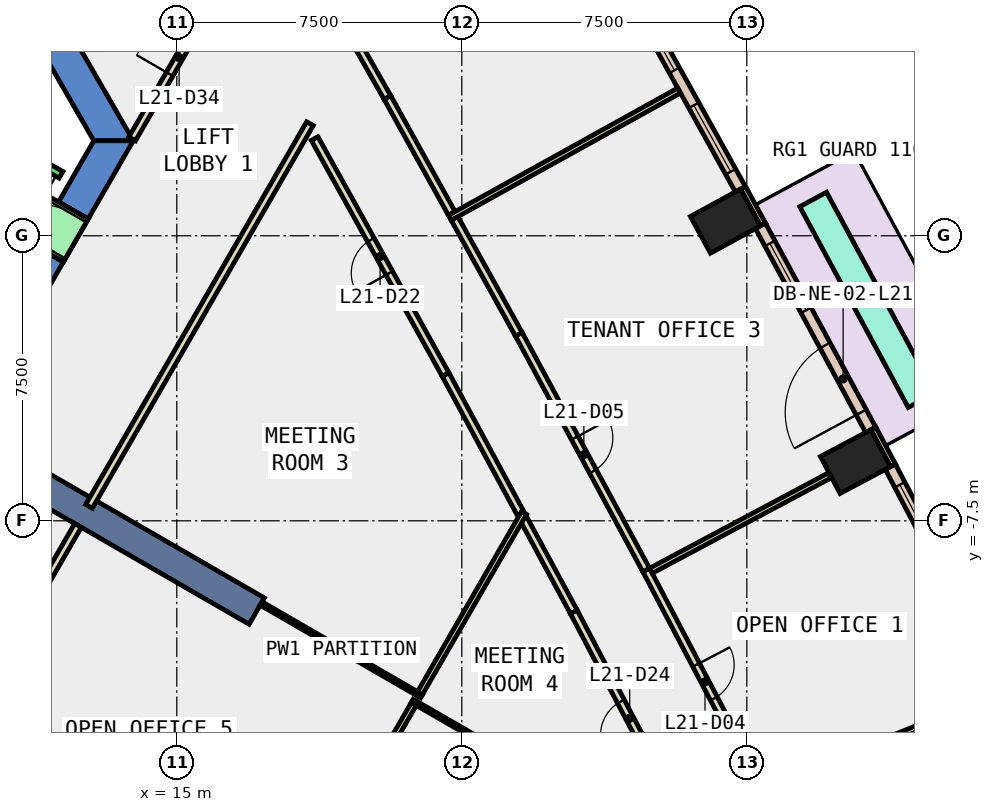
"""IFC4 building model, lengths in metres.
Left out: names, types, materials, properties, quantities, classifications, styles, units other than length and angle.
Written with IfcOpenShell. Run it as: python <this file> out.ifc"""

import sys

from ifc_helpers import new_model, si_unit, direction, frame, frame_2d, origin, origin_2d, place, context, subcontext, project, spatial, polyline, rectangle, outline, extrude, element, fill, save


model = new_model("IFC4")
c1 = context("Model", 3, precision=1e-05, world=origin(), true_north=direction((0.0, 1.0)))
c2 = subcontext(c1, "Body", "Model", "MODEL_VIEW")
j1 = project(units=[si_unit("LENGTHUNIT", "METRE"), si_unit("PLANEANGLEUNIT", "RADIAN")], contexts=[c1])
p1 = place(None, origin())
s1 = spatial("IfcSite", under=j1, at=p1, CompositionType="ELEMENT")
p2 = place(p1, origin())
s2 = spatial("IfcBuilding", under=s1, at=p2, CompositionType="ELEMENT")
p3 = place(p2, frame((0.0, 0.0, 99.2)))
s3 = spatial("IfcBuildingStorey", under=s2, at=p3, CompositionType="ELEMENT", Elevation=99.2)
for number, where, z_axis, x_axis in (
    (1, (32.858, -5.943, -0.4), (0.0, 0.0, 1.0), (-0.469, 0.883, 0.0)),
    (2, (29.438, 0.385, -0.4), (0.0, 0.0, 1.0), (-0.48, 0.877, 0.0)),
):
    element("IfcColumn", number, at=place(p3, frame(where, z_axis=z_axis, x_axis=x_axis)), inside=s3, PredefinedType="COLUMN", context=c2, shape_type="SweptSolid", body=[
        extrude(rectangle(XDim=1.1, YDim=1.5, at=origin_2d()), origin(), (0.0, 0.0, 1.0), 4.2),
    ])
p4 = place(p3, frame((0.0, 0.0, -0.4)))
e3 = element("IfcWall", 3, at=p4, inside=s3, PredefinedType="SHEAR", context=c2, shape_type="SweptSolid", body=[
    extrude(outline(polyline([(8.517, 11.748), (7.738, 11.298), (12.817, 2.5), (13.856, 2.5), (8.517, 11.748)])), origin(), (0.0, 0.0, 1.0), 4.2),
])
p5 = place(p3, frame((0.0, 0.0, -0.4)))
e4 = element("IfcWall", 4, at=p5, inside=s3, PredefinedType="SHEAR", context=c2, shape_type="SweptSolid", body=[
    extrude(outline(polyline([(12.017, -0.686), (11.238, -0.236), (10.588, -1.361), (11.367, -1.811), (12.017, -0.686)])), origin(), (0.0, 0.0, 1.0), 4.2),
])
p6 = place(p3, frame((0.0, 0.0, -0.4)))
e5 = element("IfcWall", 5, at=p6, inside=s3, PredefinedType="SHEAR", context=c2, shape_type="SweptSolid", body=[
    extrude(outline(polyline([(11.888, 0.89), (12.667, 0.44), (13.856, 2.5), (12.817, 2.5), (11.888, 0.89)])), origin(), (0.0, 0.0, 1.0), 4.2),
])
p7 = place(p3, frame((0.0, 0.0, 3.6)))
e6 = element("IfcWall", 6, at=p7, inside=s3, PredefinedType="SHEAR", context=c2, shape_type="SweptSolid", body=[
    extrude(outline(polyline([(12.667, 0.44), (11.888, 0.89), (11.238, -0.236), (12.017, -0.686), (12.667, 0.44)])), origin(), (0.0, 0.0, 1.0), 0.2),
])
p8 = place(p3, frame((9.31, -5.375, -0.4), z_axis=(0.0, 0.0, 1.0), x_axis=(0.866017533419, -0.500013631625, 0.0)))
e7 = element("IfcWall", 7, at=p8, inside=s3, PredefinedType="SHEAR", context=c2, shape_type="SweptSolid", body=[
    extrude(rectangle(XDim=9.0, YDim=0.8, at=frame_2d((4.5, 0.0))), origin(), (0.0, 0.0, 1.0), 4.2),
])
p9 = place(p3, frame((33.845, -6.042, 0.0), z_axis=(0.0, 0.0, 1.0), x_axis=(-0.46919310775, 0.883095593716, 0.0)))
e8 = element("IfcWall", 8, at=p9, inside=s3, PredefinedType="STANDARD", context=c2, shape_type="SweptSolid", body=[
    extrude(rectangle(XDim=1.099, YDim=0.15, at=frame_2d((0.55, 0.0))), origin(), (0.0, 0.0, 1.0), 3.8),
])
p10 = place(p3, frame((30.426, 0.298, 0.0), z_axis=(0.0, 0.0, 1.0), x_axis=(-0.479737645119, 0.877411985247, 0.0)))
e9 = element("IfcWall", 9, at=p10, inside=s3, PredefinedType="STANDARD", context=c2, shape_type="SweptSolid", body=[
    extrude(rectangle(XDim=1.101, YDim=0.15, at=frame_2d((0.55, 0.0))), origin(), (0.0, 0.0, 1.0), 3.8),
])
p11 = place(p3, frame((36.633, -11.511, 0.0), z_axis=(0.0, 0.0, 1.0), x_axis=(-0.465380908665, 0.88511050714, 0.0)))
e10 = element("IfcWall", 10, at=p11, inside=s3, PredefinedType="STANDARD", context=c2, shape_type="SweptSolid", body=[
    extrude(rectangle(XDim=6.139, YDim=0.3, at=frame_2d((3.07, 0.0))), origin(), (0.0, 0.0, 1.0), 3.8),
])
p12 = place(p11, frame((0.535, 0.0, 0.9)))
e11 = element("IfcOpeningElement", 11, at=p12, cuts=e10, PredefinedType="OPENING", context=c2, shape_type="SweptSolid", body=[
    extrude(rectangle(XDim=2.0, YDim=2.6, at=frame_2d((1.0, 1.3))), frame((0.0, 0.16, 0.0), z_axis=(0.0, -1.0, 0.0), x_axis=(1.0, 0.0, 0.0)), (0.0, 0.0, 1.0), 0.32),
])
p13 = place(p11, frame((3.604, 0.0, 0.9)))
e12 = element("IfcOpeningElement", 12, at=p13, cuts=e10, PredefinedType="OPENING", context=c2, shape_type="SweptSolid", body=[
    extrude(rectangle(XDim=2.0, YDim=2.6, at=frame_2d((1.0, 1.3))), frame((0.0, 0.16, 0.0), z_axis=(0.0, -1.0, 0.0), x_axis=(1.0, 0.0, 0.0)), (0.0, 0.0, 1.0), 0.32),
])
p14 = place(p3, frame((33.26, -5.108, 0.0), z_axis=(0.0, 0.0, 1.0), x_axis=(-0.475573079782, 0.879676216449, 0.0)))
e13 = element("IfcWall", 13, at=p14, inside=s3, PredefinedType="STANDARD", context=c2, shape_type="SweptSolid", body=[
    extrude(rectangle(XDim=6.104, YDim=0.3, at=frame_2d((3.052, 0.0))), origin(), (0.0, 0.0, 1.0), 3.8),
])
p15 = place(p14, frame((0.526, 0.0, 0.0)))
e14 = element("IfcOpeningElement", 14, at=p15, cuts=e13, PredefinedType="OPENING", context=c2, shape_type="SweptSolid", body=[
    extrude(rectangle(XDim=2.0, YDim=2.4, at=frame_2d((1.0, 1.2))), frame((0.0, 0.16, 0.0), z_axis=(0.0, -1.0, 0.0), x_axis=(1.0, 0.0, 0.0)), (0.0, 0.0, 1.0), 0.32),
])
p16 = place(p14, frame((3.578, 0.0, 0.9)))
e15 = element("IfcOpeningElement", 15, at=p16, cuts=e13, PredefinedType="OPENING", context=c2, shape_type="SweptSolid", body=[
    extrude(rectangle(XDim=2.0, YDim=2.6, at=frame_2d((1.0, 1.3))), frame((0.0, 0.16, 0.0), z_axis=(0.0, -1.0, 0.0), x_axis=(1.0, 0.0, 0.0)), (0.0, 0.0, 1.0), 0.32),
])
p17 = place(p3, frame((29.83, 1.225, 0.0), z_axis=(0.0, 0.0, 1.0), x_axis=(-0.485170774404, 0.874419418623, 0.0)))
e16 = element("IfcWall", 16, at=p17, inside=s3, PredefinedType="STANDARD", context=c2, shape_type="SweptSolid", body=[
    extrude(rectangle(XDim=6.103, YDim=0.3, at=frame_2d((3.052, 0.0))), origin(), (0.0, 0.0, 1.0), 3.8),
])
p18 = place(p17, frame((0.526, 0.0, 0.9)))
e17 = element("IfcOpeningElement", 17, at=p18, cuts=e16, PredefinedType="OPENING", context=c2, shape_type="SweptSolid", body=[
    extrude(rectangle(XDim=2.0, YDim=2.6, at=frame_2d((1.0, 1.3))), frame((0.0, 0.16, 0.0), z_axis=(0.0, -1.0, 0.0), x_axis=(1.0, 0.0, 0.0)), (0.0, 0.0, 1.0), 0.32),
])
p19 = place(p17, frame((3.578, 0.0, 0.9)))
e18 = element("IfcOpeningElement", 18, at=p19, cuts=e16, PredefinedType="OPENING", context=c2, shape_type="SweptSolid", body=[
    extrude(rectangle(XDim=2.0, YDim=2.6, at=frame_2d((1.0, 1.3))), frame((0.0, 0.16, 0.0), z_axis=(0.0, -1.0, 0.0), x_axis=(1.0, 0.0, 0.0)), (0.0, 0.0, 1.0), 0.32),
])
p20 = place(p3, frame((34.599, -4.328, 0.0), z_axis=(0.0, 0.0, 1.0), x_axis=(-0.475304416573, 0.879821408916, 0.0)))
e19 = element("IfcWall", 19, at=p20, inside=s3, PredefinedType="STANDARD", context=c2, shape_type="SweptSolid", body=[
    extrude(rectangle(XDim=6.005, YDim=0.8, at=frame_2d((3.002, 0.0))), origin(), (0.0, 0.0, 1.0), 0.8),
])
p21 = place(p3, frame((24.051, -7.315, 0.0), z_axis=(0.0, 0.0, 1.0), x_axis=(-0.475308630647, 0.87981913234, 0.0)))
e20 = element("IfcWall", 20, at=p21, inside=s3, PredefinedType="PARTITIONING", context=c2, shape_type="SweptSolid", body=[
    extrude(rectangle(XDim=4.166, YDim=0.2, at=frame_2d((2.083, 0.0))), origin(), (0.0, 0.0, 1.0), 3.8),
])
p22 = place(p3, frame((22.071, -3.65, 0.0), z_axis=(0.0, 0.0, 1.0), x_axis=(-0.485198988697, 0.874403763354, 0.0)))
e21 = element("IfcWall", 21, at=p22, inside=s3, PredefinedType="PARTITIONING", context=c2, shape_type="SweptSolid", body=[
    extrude(rectangle(XDim=7.098, YDim=0.2, at=frame_2d((3.549, 0.0))), origin(), (0.0, 0.0, 1.0), 3.8),
])
p23 = place(p22, frame((3.049, 0.0, 0.0)))
e22 = element("IfcOpeningElement", 22, at=p23, cuts=e21, PredefinedType="OPENING", context=c2, shape_type="SweptSolid", body=[
    extrude(rectangle(XDim=1.0, YDim=2.1, at=frame_2d((0.5, 1.05))), frame((0.0, 0.11, 0.0), z_axis=(0.0, -1.0, 0.0), x_axis=(1.0, 0.0, 0.0)), (0.0, 0.0, 1.0), 0.22),
])
p24 = place(p3, frame((28.39, -15.495, 0.0), z_axis=(0.0, 0.0, 1.0), x_axis=(-0.465367816287, 0.885117390838, 0.0)))
e23 = element("IfcWall", 23, at=p24, inside=s3, PredefinedType="PARTITIONING", context=c2, shape_type="SweptSolid", body=[
    extrude(rectangle(XDim=6.326, YDim=0.2, at=frame_2d((3.163, 0.0))), origin(), (0.0, 0.0, 1.0), 3.8),
])
p25 = place(p24, frame((2.663, 0.0, 0.0)))
e24 = element("IfcOpeningElement", 24, at=p25, cuts=e23, PredefinedType="OPENING", context=c2, shape_type="SweptSolid", body=[
    extrude(rectangle(XDim=1.0, YDim=2.1, at=frame_2d((0.5, 1.05))), frame((0.0, 0.11, 0.0), z_axis=(0.0, -1.0, 0.0), x_axis=(1.0, 0.0, 0.0)), (0.0, 0.0, 1.0), 0.22),
])
p26 = place(p3, frame((25.446, -9.896, 0.0), z_axis=(0.0, 0.0, 1.0), x_axis=(-0.475427182652, 0.879755076141, 0.0)))
e25 = element("IfcWall", 25, at=p26, inside=s3, PredefinedType="PARTITIONING", context=c2, shape_type="SweptSolid", body=[
    extrude(rectangle(XDim=2.785, YDim=0.2, at=frame_2d((1.393, 0.0))), origin(), (0.0, 0.0, 1.0), 3.8),
])
p27 = place(p3, frame((27.353, -8.794, 0.0), z_axis=(0.0, 0.0, 1.0), x_axis=(0.465239168813, -0.885185017836, 0.0)))
e26 = element("IfcWall", 26, at=p27, inside=s3, PredefinedType="PARTITIONING", context=c2, shape_type="SweptSolid", body=[
    extrude(rectangle(XDim=6.646, YDim=0.2, at=frame_2d((3.323, 0.0))), origin(), (0.0, 0.0, 1.0), 3.8),
])
p28 = place(p27, frame((2.823, 0.0, 0.0)))
e27 = element("IfcOpeningElement", 27, at=p28, cuts=e26, PredefinedType="OPENING", context=c2, shape_type="SweptSolid", body=[
    extrude(rectangle(XDim=1.0, YDim=2.1, at=frame_2d((0.5, 1.05))), frame((0.0, 0.11, 0.0), z_axis=(0.0, -1.0, 0.0), x_axis=(1.0, 0.0, 0.0)), (0.0, 0.0, 1.0), 0.22),
])
p29 = place(p3, frame((22.309, 0.456, 0.0), z_axis=(0.0, 0.0, 1.0), x_axis=(0.484982854201, -0.87452365956, 0.0)))
e28 = element("IfcWall", 28, at=p29, inside=s3, PredefinedType="PARTITIONING", context=c2, shape_type="SweptSolid", body=[
    extrude(rectangle(XDim=3.487, YDim=0.2, at=frame_2d((1.743, 0.0))), origin(), (0.0, 0.0, 1.0), 3.8),
])
p30 = place(p3, frame((24.0, -2.593, 0.0), z_axis=(0.0, 0.0, 1.0), x_axis=(0.475480817472, -0.879726089312, 0.0)))
e29 = element("IfcWall", 29, at=p30, inside=s3, PredefinedType="PARTITIONING", context=c2, shape_type="SweptSolid", body=[
    extrude(rectangle(XDim=7.05, YDim=0.2, at=frame_2d((3.525, 0.0))), origin(), (0.0, 0.0, 1.0), 3.8),
])
p31 = place(p30, frame((3.1, 0.0, 0.0)))
e30 = element("IfcOpeningElement", 30, at=p31, cuts=e29, PredefinedType="OPENING", context=c2, shape_type="SweptSolid", body=[
    extrude(rectangle(XDim=1.0, YDim=2.1, at=frame_2d((0.5, 1.05))), frame((0.0, 0.11, 0.0), z_axis=(0.0, -1.0, 0.0), x_axis=(1.0, 0.0, 0.0)), (0.0, 0.0, 1.0), 0.22),
])
p32 = place(p3, frame((16.98, 9.89, 0.0), z_axis=(0.0, 0.0, 1.0), x_axis=(0.495123170501, -0.868822793228, 0.0)))
e31 = element("IfcWall", 31, at=p32, inside=s3, PredefinedType="PARTITIONING", context=c2, shape_type="SweptSolid", body=[
    extrude(rectangle(XDim=7.198, YDim=0.2, at=frame_2d((3.599, 0.0))), origin(), (0.0, 0.0, 1.0), 3.8),
])
p33 = place(p32, frame((3.099, 0.0, 0.0)))
e32 = element("IfcOpeningElement", 32, at=p33, cuts=e31, PredefinedType="OPENING", context=c2, shape_type="SweptSolid", body=[
    extrude(rectangle(XDim=1.0, YDim=2.1, at=frame_2d((0.5, 1.05))), frame((0.0, 0.11, 0.0), z_axis=(0.0, -1.0, 0.0), x_axis=(1.0, 0.0, 0.0)), (0.0, 0.0, 1.0), 0.22),
])
p34 = place(p3, frame((20.544, 3.636, 0.0), z_axis=(0.0, 0.0, 1.0), x_axis=(0.485250552989, -0.874375148792, 0.0)))
e33 = element("IfcWall", 33, at=p34, inside=s3, PredefinedType="PARTITIONING", context=c2, shape_type="SweptSolid", body=[
    extrude(rectangle(XDim=3.487, YDim=0.2, at=frame_2d((1.744, 0.0))), origin(), (0.0, 0.0, 1.0), 3.8),
])
p35 = place(p3, frame((13.827, 2.55, 0.0), z_axis=(0.0, 0.0, 1.0), x_axis=(0.500070719615, 0.865984569946, 0.0)))
e34 = element("IfcWall", 34, at=p35, inside=s3, PredefinedType="PARTITIONING", context=c2, shape_type="SweptSolid", body=[
    extrude(rectangle(XDim=4.935, YDim=0.2, at=frame_2d((2.468, 0.0))), origin(), (0.0, 0.0, 1.0), 3.8),
])
p36 = place(p35, frame((1.968, 0.0, 0.0)))
e35 = element("IfcOpeningElement", 35, at=p36, cuts=e34, PredefinedType="OPENING", context=c2, shape_type="SweptSolid", body=[
    extrude(rectangle(XDim=1.0, YDim=2.1, at=frame_2d((0.5, 1.05))), frame((0.0, 0.11, 0.0), z_axis=(0.0, -1.0, 0.0), x_axis=(1.0, 0.0, 0.0)), (0.0, 0.0, 1.0), 0.22),
])
p37 = place(p35, frame((3.068, 0.0, 0.0)))
e36 = element("IfcOpeningElement", 36, at=p37, cuts=e34, PredefinedType="OPENING", context=c2, shape_type="SweptSolid", body=[
    extrude(rectangle(XDim=1.0, YDim=2.1, at=frame_2d((0.5, 1.05))), frame((0.0, 0.11, 0.0), z_axis=(0.0, -1.0, 0.0), x_axis=(1.0, 0.0, 0.0)), (0.0, 0.0, 1.0), 0.22),
])
p38 = place(p3, frame((12.401, -7.621, 0.0), z_axis=(0.0, 0.0, 1.0), x_axis=(-0.499983724212, -0.866034800411, 0.0)))
e37 = element("IfcWall", 37, at=p38, inside=s3, PredefinedType="PARTITIONING", context=c2, shape_type="SweptSolid", body=[
    extrude(rectangle(XDim=9.302, YDim=0.2, at=frame_2d((4.651, 0.0))), origin(), (0.0, 0.0, 1.0), 3.8),
])
p39 = place(p3, frame((18.503, 2.949, 0.0), z_axis=(0.0, 0.0, 1.0), x_axis=(-0.49997390151, -0.86604047123, 0.0)))
e38 = element("IfcWall", 38, at=p39, inside=s3, PredefinedType="PARTITIONING", context=c2, shape_type="SweptSolid", body=[
    extrude(rectangle(XDim=11.626, YDim=0.2, at=frame_2d((5.813, 0.0))), origin(), (0.0, 0.0, 1.0), 3.8),
])
p40 = place(p3, frame((17.219, -9.676, 0.0), z_axis=(0.0, 0.0, 1.0), x_axis=(0.86598459596, -0.500070674565, 0.0)))
e39 = element("IfcWall", 39, at=p40, inside=s3, PredefinedType="PARTITIONING", context=c2, shape_type="SweptSolid", body=[
    extrude(rectangle(XDim=4.875, YDim=0.1, at=frame_2d((2.438, 0.0))), origin(), (0.0, 0.0, 1.0), 3.8),
])
p41 = place(p3, frame((21.236, -12.319, 0.0), z_axis=(0.0, 0.0, 1.0), x_axis=(-0.500016488359, -0.866015884017, 0.0)))
e40 = element("IfcWall", 40, at=p41, inside=s3, PredefinedType="PARTITIONING", context=c2, shape_type="SweptSolid", body=[
    extrude(rectangle(XDim=5.702, YDim=0.15, at=frame_2d((2.851, 0.0))), origin(), (0.0, 0.0, 1.0), 3.8),
])
p42 = place(p3, frame((24.137, -7.294, 0.0), z_axis=(0.0, 0.0, 1.0), x_axis=(-0.500001804394, -0.866024362014, 0.0)))
e41 = element("IfcWall", 41, at=p42, inside=s3, PredefinedType="PARTITIONING", context=c2, shape_type="SweptSolid", body=[
    extrude(rectangle(XDim=5.472, YDim=0.15, at=frame_2d((2.736, 0.0))), origin(), (0.0, 0.0, 1.0), 3.8),
])
p43 = place(p3, frame((21.196, -12.238, 0.0), z_axis=(0.0, 0.0, 1.0), x_axis=(0.866023145199, -0.500003911965, 0.0)))
e42 = element("IfcWall", 42, at=p43, inside=s3, PredefinedType="PARTITIONING", context=c2, shape_type="SweptSolid", body=[
    extrude(rectangle(XDim=8.71, YDim=0.1, at=frame_2d((4.355, 0.0))), origin(), (0.0, 0.0, 1.0), 3.8),
])
p44 = place(p3, frame((30.399, -14.588, 0.0), z_axis=(0.0, 0.0, 1.0), x_axis=(0.92913411584, 0.36974287658, 0.0)))
e43 = element("IfcWall", 43, at=p44, inside=s3, PredefinedType="PARTITIONING", context=c2, shape_type="SweptSolid", body=[
    extrude(rectangle(XDim=5.469, YDim=0.15, at=frame_2d((2.734, 0.0))), origin(), (0.0, 0.0, 1.0), 3.8),
])
p45 = place(p3, frame((27.476, -8.814, 0.0), z_axis=(0.0, 0.0, 1.0), x_axis=(0.882440424847, 0.47042416668, 0.0)))
e44 = element("IfcWall", 44, at=p45, inside=s3, PredefinedType="PARTITIONING", context=c2, shape_type="SweptSolid", body=[
    extrude(rectangle(XDim=5.329, YDim=0.15, at=frame_2d((2.665, 0.0))), origin(), (0.0, 0.0, 1.0), 3.8),
])
p46 = place(p3, frame((22.185, 0.473, 0.0), z_axis=(0.0, 0.0, 1.0), x_axis=(0.874372498137, 0.485255329184, 0.0)))
e45 = element("IfcWall", 45, at=p46, inside=s3, PredefinedType="PARTITIONING", context=c2, shape_type="SweptSolid", body=[
    extrude(rectangle(XDim=6.9, YDim=0.15, at=frame_2d((3.45, 0.0))), origin(), (0.0, 0.0, 1.0), 3.8),
])
p47 = place(p3, frame((9.788, 2.853, 0.0), z_axis=(0.0, 0.0, 1.0), x_axis=(0.865998541277, -0.500046524342, 0.0)))
e46 = element("IfcWall", 46, at=p47, inside=s3, PredefinedType="STANDARD", context=c2, shape_type="SweptSolid", body=[
    extrude(rectangle(XDim=2.5, YDim=0.2, at=frame_2d((1.25, 0.0))), origin(), (0.0, 0.0, 1.0), 3.8),
])
p48 = place(p3, frame((11.498, -0.385, 0.0), z_axis=(0.0, 0.0, 1.0), x_axis=(0.500221244143, 0.865897630733, 0.0)))
e47 = element("IfcWall", 47, at=p48, inside=s3, PredefinedType="STANDARD", context=c2, shape_type="SweptSolid", body=[
    extrude(rectangle(XDim=1.299, YDim=1.2, at=frame_2d((0.65, 0.0))), origin(), (0.0, 0.0, 1.0), 2.4),
])
p49 = place(p48, frame((0.1, 0.0, 0.0)))
e48 = element("IfcOpeningElement", 48, at=p49, cuts=e47, PredefinedType="OPENING", context=c2, shape_type="SweptSolid", body=[
    extrude(rectangle(XDim=1.1, YDim=2.3, at=frame_2d((0.55, 1.15))), frame((0.0, 0.61, 0.0), z_axis=(0.0, -1.0, 0.0), x_axis=(1.0, 0.0, 0.0)), (0.0, 0.0, 1.0), 1.22),
])
p50 = place(p13, origin())
e49 = element("IfcWindow", 49, at=p50, inside=s3, PartitioningType="SINGLE_PANEL", PredefinedType="WINDOW", context=c2, shape_type="SweptSolid", body=[
    extrude(rectangle(XDim=2.0, YDim=2.6, at=frame_2d((1.0, 1.3))), frame((0.0, 0.03, 0.0), z_axis=(0.0, -1.0, 0.0), x_axis=(1.0, 0.0, 0.0)), (0.0, 0.0, 1.0), 0.06),
])
fill(e12, e49)
p51 = place(p15, origin())
e50 = element("IfcDoor", 50, at=p51, inside=s3, OperationType="SLIDING_TO_LEFT", PredefinedType="DOOR", context=c2, shape_type="SweptSolid", body=[
    extrude(rectangle(XDim=2.0, YDim=2.4, at=frame_2d((1.0, 1.2))), frame((0.0, 0.025, 0.0), z_axis=(0.0, -1.0, 0.0), x_axis=(1.0, 0.0, 0.0)), (0.0, 0.0, 1.0), 0.05),
])
fill(e14, e50)
p52 = place(p16, origin())
e51 = element("IfcWindow", 51, at=p52, inside=s3, PartitioningType="SINGLE_PANEL", PredefinedType="WINDOW", context=c2, shape_type="SweptSolid", body=[
    extrude(rectangle(XDim=2.0, YDim=2.6, at=frame_2d((1.0, 1.3))), frame((0.0, 0.03, 0.0), z_axis=(0.0, -1.0, 0.0), x_axis=(1.0, 0.0, 0.0)), (0.0, 0.0, 1.0), 0.06),
])
fill(e15, e51)
p53 = place(p18, origin())
e52 = element("IfcWindow", 52, at=p53, inside=s3, PartitioningType="SINGLE_PANEL", PredefinedType="WINDOW", context=c2, shape_type="SweptSolid", body=[
    extrude(rectangle(XDim=2.0, YDim=2.6, at=frame_2d((1.0, 1.3))), frame((0.0, 0.03, 0.0), z_axis=(0.0, -1.0, 0.0), x_axis=(1.0, 0.0, 0.0)), (0.0, 0.0, 1.0), 0.06),
])
fill(e17, e52)
p54 = place(p19, origin())
e53 = element("IfcWindow", 53, at=p54, inside=s3, PartitioningType="SINGLE_PANEL", PredefinedType="WINDOW", context=c2, shape_type="SweptSolid", body=[
    extrude(rectangle(XDim=2.0, YDim=2.6, at=frame_2d((1.0, 1.3))), frame((0.0, 0.03, 0.0), z_axis=(0.0, -1.0, 0.0), x_axis=(1.0, 0.0, 0.0)), (0.0, 0.0, 1.0), 0.06),
])
fill(e18, e53)
p55 = place(p28, origin())
e54 = element("IfcDoor", 54, at=p55, inside=s3, OperationType="SINGLE_SWING_LEFT", PredefinedType="DOOR", context=c2, shape_type="SweptSolid", body=[
    extrude(rectangle(XDim=1.0, YDim=2.1, at=frame_2d((0.5, 1.05))), frame((0.0, 0.025, 0.0), z_axis=(0.0, -1.0, 0.0), x_axis=(1.0, 0.0, 0.0)), (0.0, 0.0, 1.0), 0.05),
])
fill(e27, e54)
p56 = place(p31, origin())
e55 = element("IfcDoor", 55, at=p56, inside=s3, OperationType="SINGLE_SWING_LEFT", PredefinedType="DOOR", context=c2, shape_type="SweptSolid", body=[
    extrude(rectangle(XDim=1.0, YDim=2.1, at=frame_2d((0.5, 1.05))), frame((0.0, 0.025, 0.0), z_axis=(0.0, -1.0, 0.0), x_axis=(1.0, 0.0, 0.0)), (0.0, 0.0, 1.0), 0.05),
])
fill(e30, e55)
p57 = place(p23, origin())
e56 = element("IfcDoor", 56, at=p57, inside=s3, OperationType="SINGLE_SWING_RIGHT", PredefinedType="DOOR", context=c2, shape_type="SweptSolid", body=[
    extrude(rectangle(XDim=1.0, YDim=2.1, at=frame_2d((0.5, 1.05))), frame((0.0, 0.025, 0.0), z_axis=(0.0, -1.0, 0.0), x_axis=(1.0, 0.0, 0.0)), (0.0, 0.0, 1.0), 0.05),
])
fill(e22, e56)
p58 = place(p25, origin())
e57 = element("IfcDoor", 57, at=p58, inside=s3, OperationType="SINGLE_SWING_LEFT", PredefinedType="DOOR", context=c2, shape_type="SweptSolid", body=[
    extrude(rectangle(XDim=1.0, YDim=2.1, at=frame_2d((0.5, 1.05))), frame((0.0, 0.025, 0.0), z_axis=(0.0, -1.0, 0.0), x_axis=(1.0, 0.0, 0.0)), (0.0, 0.0, 1.0), 0.05),
])
fill(e24, e57)
p59 = place(p36, origin())
e58 = element("IfcDoor", 58, at=p59, inside=s3, OperationType="SINGLE_SWING_LEFT", PredefinedType="DOOR", context=c2, shape_type="SweptSolid", body=[
    extrude(rectangle(XDim=1.0, YDim=2.1, at=frame_2d((0.5, 1.05))), frame((0.0, 0.025, 0.0), z_axis=(0.0, -1.0, 0.0), x_axis=(1.0, 0.0, 0.0)), (0.0, 0.0, 1.0), 0.05),
])
fill(e35, e58)
p60 = place(p49, origin())
e59 = element("IfcDoor", 59, at=p60, inside=s3, OperationType="SLIDING_TO_LEFT", PredefinedType="DOOR", context=c2, shape_type="SweptSolid", body=[
    extrude(rectangle(XDim=1.1, YDim=2.3, at=frame_2d((0.55, 1.15))), frame((0.0, 0.025, 0.0), z_axis=(0.0, -1.0, 0.0), x_axis=(1.0, 0.0, 0.0)), (0.0, 0.0, 1.0), 0.05),
])
fill(e48, e59)
save(model, sys.argv[1])
